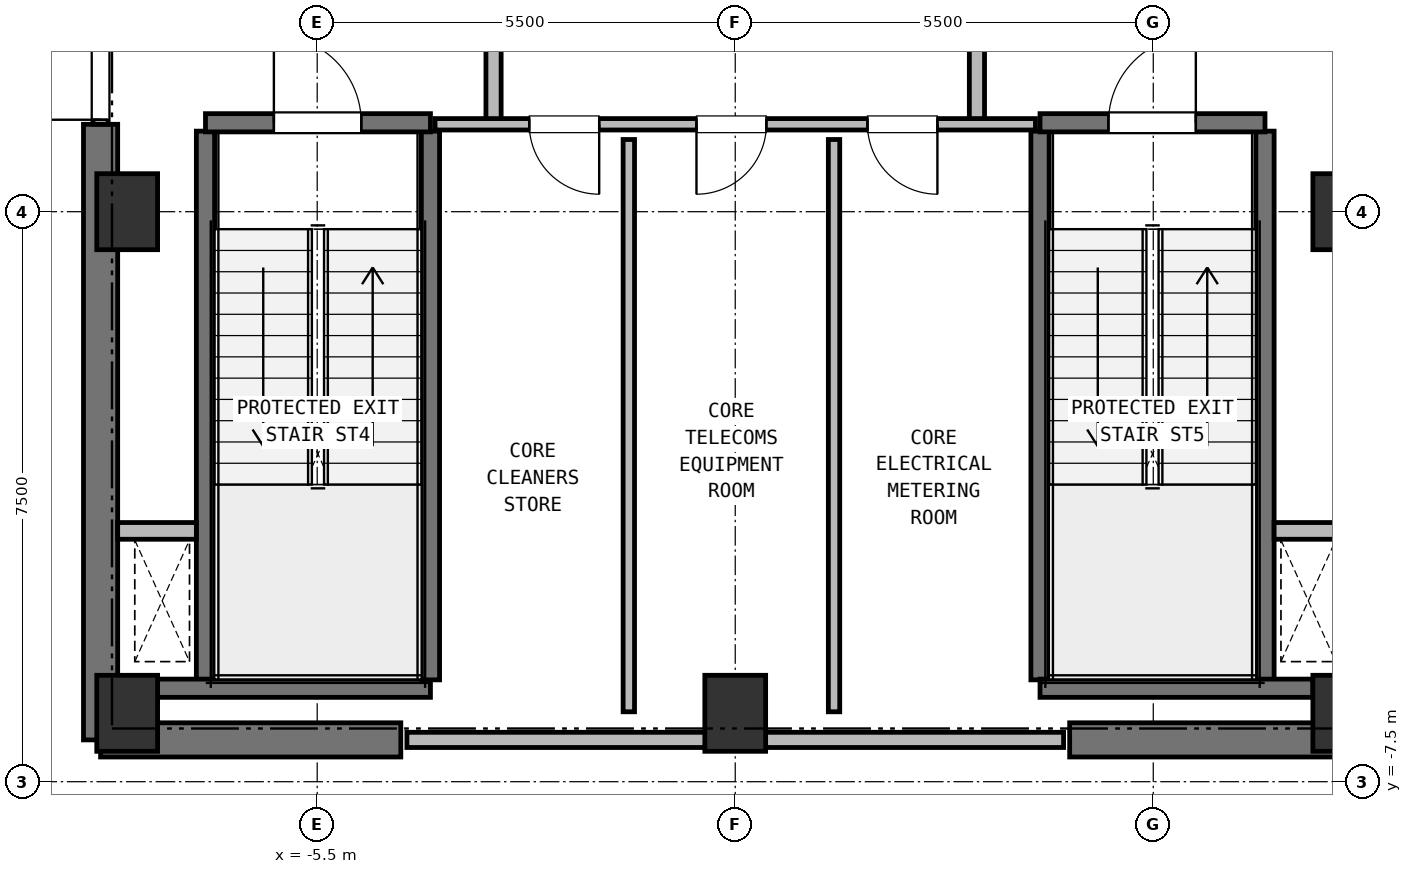
"""IFC4 building model, lengths in metres.
Left out: names, types, materials, properties, quantities, classifications, styles, units other than length and angle.
Written with IfcOpenShell. Run it as: python <this file> out.ifc"""

import sys

from ifc_helpers import new_model, si_unit, direction, frame, frame_2d, origin, origin_2d, place, context, subcontext, project, spatial, rectangle, extrude, element, fill, save


model = new_model("IFC4")
c1 = context("Model", 3, precision=1e-05, world=origin(), true_north=direction((0.0, 1.0)))
c2 = subcontext(c1, "Body", "Model", "MODEL_VIEW")
j1 = project(units=[si_unit("LENGTHUNIT", "METRE"), si_unit("PLANEANGLEUNIT", "RADIAN")], contexts=[c1])
p1 = place(None, origin())
s1 = spatial("IfcSite", under=j1, at=p1, CompositionType="ELEMENT")
p2 = place(p1, origin())
s2 = spatial("IfcBuilding", under=s1, at=p2, CompositionType="ELEMENT")
p3 = place(p2, frame((0.0, 0.0, 281.6)))
s3 = spatial("IfcBuildingStorey", under=s2, at=p3, CompositionType="ELEMENT", Elevation=281.6)
for number, where, z_axis, x_axis in (
    (1, (-8.0, -6.6, 0.0), (0.0, 0.0, 1.0), (1.0, 0.0, 0.0)),
    (2, (0.0, -6.6, 0.0), (0.0, 0.0, 1.0), (1.0, 0.0, 0.0)),
    (3, (8.0, -6.6, 0.0), (0.0, 0.0, 1.0), (1.0, 0.0, 0.0)),
    (4, (8.0, 0.0, 0.0), (0.0, 0.0, 1.0), (1.0, 0.0, 0.0)),
    (5, (-8.0, 0.0, 0.0), (0.0, 0.0, 1.0), (1.0, 0.0, 0.0)),
):
    element("IfcColumn", number, at=place(p3, frame(where, z_axis=z_axis, x_axis=x_axis)), inside=s3, PredefinedType="COLUMN", context=c2, shape_type="SweptSolid", body=[
        extrude(rectangle(XDim=0.8, YDim=1.0, at=origin_2d()), origin(), (0.0, 0.0, 1.0), 4.4),
    ])
for number, where, z_axis, x_axis in (
    (6, (-8.35, -6.95, 0.0), (0.0, 0.0, 1.0), (1.0, 0.0, 0.0)),
    (7, (4.4, -6.95, 0.0), (0.0, 0.0, 1.0), (1.0, 0.0, 0.0)),
):
    element("IfcWall", number, at=place(p3, frame(where, z_axis=z_axis, x_axis=x_axis)), inside=s3, PredefinedType="SHEAR", context=c2, shape_type="SweptSolid", body=[
        extrude(rectangle(XDim=3.95, YDim=0.45, at=frame_2d((1.975, 0.0))), origin(), (0.0, 0.0, 1.0), 4.13),
    ])
p4 = place(p3, frame((-8.35, -6.95, 0.0), z_axis=(0.0, 0.0, 1.0), x_axis=(0.0, 1.0, 0.0)))
e8 = element("IfcWall", 8, at=p4, inside=s3, PredefinedType="SHEAR", context=c2, shape_type="SweptSolid", body=[
    extrude(rectangle(XDim=8.1, YDim=0.45, at=frame_2d((4.05, 0.0))), origin(), (0.0, 0.0, 1.0), 4.13),
])
p5 = place(p3, frame((-6.97, -6.16, 0.0), z_axis=(0.0, 0.0, 1.0), x_axis=(0.0, 1.0, 0.0)))
e9 = element("IfcWall", 9, at=p5, inside=s3, PredefinedType="SHEAR", context=c2, shape_type="SweptSolid", body=[
    extrude(rectangle(XDim=7.22, YDim=0.24, at=frame_2d((3.61, 0.0))), origin(), (0.0, 0.0, 1.0), 4.13),
])
p6 = place(p3, frame((-7.6, -6.27, 0.0), z_axis=(0.0, 0.0, 1.0), x_axis=(1.0, 0.0, 0.0)))
e10 = element("IfcWall", 10, at=p6, inside=s3, PredefinedType="SHEAR", context=c2, shape_type="SweptSolid", body=[
    extrude(rectangle(XDim=3.59, YDim=0.24, at=frame_2d((1.795, 0.0))), origin(), (0.0, 0.0, 1.0), 4.13),
])
p7 = place(p3, frame((-4.01, -6.16, 0.0), z_axis=(0.0, 0.0, 1.0), x_axis=(0.0, 1.0, 0.0)))
e11 = element("IfcWall", 11, at=p7, inside=s3, PredefinedType="SHEAR", context=c2, shape_type="SweptSolid", body=[
    extrude(rectangle(XDim=7.22, YDim=0.24, at=frame_2d((3.61, 0.0))), origin(), (0.0, 0.0, 1.0), 4.13),
])
p8 = place(p3, frame((-6.97, 1.17, 0.0), z_axis=(0.0, 0.0, 1.0), x_axis=(1.0, 0.0, 0.0)))
e12 = element("IfcWall", 12, at=p8, inside=s3, PredefinedType="SHEAR", context=c2, shape_type="SweptSolid", body=[
    extrude(rectangle(XDim=2.96, YDim=0.24, at=frame_2d((1.48, 0.0))), origin(), (0.0, 0.0, 1.0), 4.13),
])
p9 = place(p8, frame((0.9, 0.0, 0.0)))
e13 = element("IfcOpeningElement", 13, at=p9, cuts=e12, PredefinedType="OPENING", context=c2, shape_type="SweptSolid", body=[
    extrude(rectangle(XDim=1.15, YDim=2.15, at=frame_2d((0.575, 1.075))), frame((0.0, 0.13, 0.0), z_axis=(0.0, -1.0, 0.0), x_axis=(1.0, 0.0, 0.0)), (0.0, 0.0, 1.0), 0.26),
])
for number, where, z_axis, x_axis in (
    (14, (4.01, -6.16, 0.0), (0.0, 0.0, 1.0), (0.0, 1.0, 0.0)),
    (15, (6.97, -6.16, 0.0), (0.0, 0.0, 1.0), (0.0, 1.0, 0.0)),
):
    element("IfcWall", number, at=place(p3, frame(where, z_axis=z_axis, x_axis=x_axis)), inside=s3, PredefinedType="SHEAR", context=c2, shape_type="SweptSolid", body=[
        extrude(rectangle(XDim=7.22, YDim=0.24, at=frame_2d((3.61, 0.0))), origin(), (0.0, 0.0, 1.0), 4.13),
    ])
p10 = place(p3, frame((4.01, -6.27, 0.0), z_axis=(0.0, 0.0, 1.0), x_axis=(1.0, 0.0, 0.0)))
e16 = element("IfcWall", 16, at=p10, inside=s3, PredefinedType="SHEAR", context=c2, shape_type="SweptSolid", body=[
    extrude(rectangle(XDim=3.59, YDim=0.24, at=frame_2d((1.795, 0.0))), origin(), (0.0, 0.0, 1.0), 4.13),
])
p11 = place(p3, frame((4.01, 1.17, 0.0), z_axis=(0.0, 0.0, 1.0), x_axis=(1.0, 0.0, 0.0)))
e17 = element("IfcWall", 17, at=p11, inside=s3, PredefinedType="SHEAR", context=c2, shape_type="SweptSolid", body=[
    extrude(rectangle(XDim=2.96, YDim=0.24, at=frame_2d((1.48, 0.0))), origin(), (0.0, 0.0, 1.0), 4.13),
])
p12 = place(p11, frame((0.9, 0.0, 0.0)))
e18 = element("IfcOpeningElement", 18, at=p12, cuts=e17, PredefinedType="OPENING", context=c2, shape_type="SweptSolid", body=[
    extrude(rectangle(XDim=1.15, YDim=2.15, at=frame_2d((0.575, 1.075))), frame((0.0, 0.13, 0.0), z_axis=(0.0, -1.0, 0.0), x_axis=(1.0, 0.0, 0.0)), (0.0, 0.0, 1.0), 0.26),
])
for number, where, z_axis, x_axis in (
    (19, (-8.125, -4.2, 0.0), (0.0, 0.0, 1.0), (1.0, 0.0, 0.0)),
    (20, (7.09, -4.2, 0.0), (0.0, 0.0, 1.0), (1.0, 0.0, 0.0)),
):
    element("IfcWall", number, at=place(p3, frame(where, z_axis=z_axis, x_axis=x_axis)), inside=s3, PredefinedType="PARTITIONING", context=c2, shape_type="SweptSolid", body=[
        extrude(rectangle(XDim=1.035, YDim=0.22, at=frame_2d((0.518, 0.0))), origin(), (0.0, 0.0, 1.0), 4.13),
    ])
p13 = place(p3, frame((-3.18, 1.15, 0.0), z_axis=(0.0, 0.0, 1.0), x_axis=(0.0, 1.0, 0.0)))
e21 = element("IfcWall", 21, at=p13, inside=s3, PredefinedType="PARTITIONING", context=c2, shape_type="SweptSolid", body=[
    extrude(rectangle(XDim=3.3, YDim=0.2, at=frame_2d((1.65, 0.0))), origin(), (0.0, 0.0, 1.0), 4.13),
])
p14 = place(p13, frame((1.08, 0.0, 0.0)))
e22 = element("IfcOpeningElement", 22, at=p14, cuts=e21, PredefinedType="OPENING", context=c2, shape_type="SweptSolid", body=[
    extrude(rectangle(XDim=1.15, YDim=2.15, at=frame_2d((0.575, 1.075))), frame((0.0, 0.11, 0.0), z_axis=(0.0, -1.0, 0.0), x_axis=(1.0, 0.0, 0.0)), (0.0, 0.0, 1.0), 0.22),
])
p15 = place(p3, frame((3.18, 1.15, 0.0), z_axis=(0.0, 0.0, 1.0), x_axis=(0.0, 1.0, 0.0)))
e23 = element("IfcWall", 23, at=p15, inside=s3, PredefinedType="PARTITIONING", context=c2, shape_type="SweptSolid", body=[
    extrude(rectangle(XDim=3.3, YDim=0.2, at=frame_2d((1.65, 0.0))), origin(), (0.0, 0.0, 1.0), 4.13),
])
p16 = place(p15, frame((1.08, 0.0, 0.0)))
e24 = element("IfcOpeningElement", 24, at=p16, cuts=e23, PredefinedType="OPENING", context=c2, shape_type="SweptSolid", body=[
    extrude(rectangle(XDim=1.15, YDim=2.15, at=frame_2d((0.575, 1.075))), frame((0.0, 0.11, 0.0), z_axis=(0.0, -1.0, 0.0), x_axis=(1.0, 0.0, 0.0)), (0.0, 0.0, 1.0), 0.22),
])
p17 = place(p3, frame((-8.35, 1.15, 0.0), z_axis=(0.0, 0.0, 1.0), x_axis=(0.0, 1.0, 0.0)))
e25 = element("IfcWall", 25, at=p17, inside=s3, PredefinedType="PARTITIONING", context=c2, shape_type="SweptSolid", body=[
    extrude(rectangle(XDim=5.4, YDim=0.2, at=frame_2d((2.7, 0.0))), origin(), (0.0, 0.0, 1.0), 4.13),
])
p18 = place(p17, frame((0.06, 0.0, 0.0)))
e26 = element("IfcOpeningElement", 26, at=p18, cuts=e25, PredefinedType="OPENING", context=c2, shape_type="SweptSolid", body=[
    extrude(rectangle(XDim=1.15, YDim=2.15, at=frame_2d((0.575, 1.075))), frame((0.0, 0.11, 0.0), z_axis=(0.0, -1.0, 0.0), x_axis=(1.0, 0.0, 0.0)), (0.0, 0.0, 1.0), 0.22),
])
p19 = place(p3, frame((3.95, 1.15, 0.0), z_axis=(0.0, 0.0, 1.0), x_axis=(-1.0, 0.0, 0.0)))
e27 = element("IfcWall", 27, at=p19, inside=s3, PredefinedType="PARTITIONING", context=c2, shape_type="SweptSolid", body=[
    extrude(rectangle(XDim=7.9, YDim=0.15, at=frame_2d((3.95, 0.0))), origin(), (0.0, 0.0, 1.0), 4.13),
])
p20 = place(p19, frame((5.74, 0.0, 0.0)))
e28 = element("IfcOpeningElement", 28, at=p20, cuts=e27, PredefinedType="OPENING", context=c2, shape_type="SweptSolid", body=[
    extrude(rectangle(XDim=0.92, YDim=2.05, at=frame_2d((0.46, 1.025))), frame((0.0, 0.085, 0.0), z_axis=(0.0, -1.0, 0.0), x_axis=(1.0, 0.0, 0.0)), (0.0, 0.0, 1.0), 0.17),
])
p21 = place(p19, frame((3.54, 0.0, 0.0)))
e29 = element("IfcOpeningElement", 29, at=p21, cuts=e27, PredefinedType="OPENING", context=c2, shape_type="SweptSolid", body=[
    extrude(rectangle(XDim=0.92, YDim=2.05, at=frame_2d((0.46, 1.025))), frame((0.0, 0.085, 0.0), z_axis=(0.0, -1.0, 0.0), x_axis=(1.0, 0.0, 0.0)), (0.0, 0.0, 1.0), 0.17),
])
p22 = place(p19, frame((1.29, 0.0, 0.0)))
e30 = element("IfcOpeningElement", 30, at=p22, cuts=e27, PredefinedType="OPENING", context=c2, shape_type="SweptSolid", body=[
    extrude(rectangle(XDim=0.92, YDim=2.05, at=frame_2d((0.46, 1.025))), frame((0.0, 0.085, 0.0), z_axis=(0.0, -1.0, 0.0), x_axis=(1.0, 0.0, 0.0)), (0.0, 0.0, 1.0), 0.17),
])
p23 = place(p3, frame((-4.32, -6.95, 0.0), z_axis=(0.0, 0.0, 1.0), x_axis=(1.0, 0.0, 0.0)))
e31 = element("IfcWall", 31, at=p23, inside=s3, PredefinedType="PARTITIONING", context=c2, shape_type="SweptSolid", body=[
    extrude(rectangle(XDim=8.64, YDim=0.2, at=frame_2d((4.32, 0.0))), origin(), (0.0, 0.0, 1.0), 4.13),
])
for number, where, z_axis, x_axis in (
    (32, (-1.4, -6.58, 0.0), (0.0, 0.0, 1.0), (0.0, 1.0, 0.0)),
    (33, (1.3, -6.58, 0.0), (0.0, 0.0, 1.0), (0.0, 1.0, 0.0)),
):
    element("IfcWall", number, at=place(p3, frame(where, z_axis=z_axis, x_axis=x_axis)), inside=s3, PredefinedType="PARTITIONING", context=c2, shape_type="SweptSolid", body=[
        extrude(rectangle(XDim=7.53, YDim=0.15, at=frame_2d((3.765, 0.0))), origin(), (0.0, 0.0, 1.0), 4.13),
    ])
p24 = place(p3, frame((-8.648, -9.151, 0.0), z_axis=(0.0, 0.0, 1.0), x_axis=(-0.693764562202, 0.720201869085, 0.0)))
e34 = element("IfcWall", 34, at=p24, inside=s3, PredefinedType="PARTITIONING", context=c2, shape_type="SweptSolid", body=[
    extrude(rectangle(XDim=2.558, YDim=0.15, at=frame_2d((1.279, 0.0))), origin(), (0.0, 0.0, 1.0), 4.13),
])
p25 = place(p9, origin())
e35 = element("IfcDoor", 35, at=p25, inside=s3, OperationType="SINGLE_SWING_LEFT", PredefinedType="DOOR", context=c2, shape_type="SweptSolid", body=[
    extrude(rectangle(XDim=1.15, YDim=2.15, at=frame_2d((0.575, 1.075))), frame((0.0, 0.025, 0.0), z_axis=(0.0, -1.0, 0.0), x_axis=(1.0, 0.0, 0.0)), (0.0, 0.0, 1.0), 0.05),
])
fill(e13, e35)
p26 = place(p12, origin())
e36 = element("IfcDoor", 36, at=p26, inside=s3, OperationType="SINGLE_SWING_RIGHT", PredefinedType="DOOR", context=c2, shape_type="SweptSolid", body=[
    extrude(rectangle(XDim=1.15, YDim=2.15, at=frame_2d((0.575, 1.075))), frame((0.0, 0.025, 0.0), z_axis=(0.0, -1.0, 0.0), x_axis=(1.0, 0.0, 0.0)), (0.0, 0.0, 1.0), 0.05),
])
fill(e18, e36)
p27 = place(p18, origin())
e37 = element("IfcDoor", 37, at=p27, inside=s3, OperationType="SINGLE_SWING_LEFT", PredefinedType="DOOR", context=c2, shape_type="SweptSolid", body=[
    extrude(rectangle(XDim=1.15, YDim=2.15, at=frame_2d((0.575, 1.075))), frame((0.0, 0.025, 0.0), z_axis=(0.0, -1.0, 0.0), x_axis=(1.0, 0.0, 0.0)), (0.0, 0.0, 1.0), 0.05),
])
fill(e26, e37)
p28 = place(p20, origin())
e38 = element("IfcDoor", 38, at=p28, inside=s3, OperationType="SINGLE_SWING_LEFT", PredefinedType="DOOR", context=c2, shape_type="SweptSolid", body=[
    extrude(rectangle(XDim=0.92, YDim=2.05, at=frame_2d((0.46, 1.025))), frame((0.0, 0.025, 0.0), z_axis=(0.0, -1.0, 0.0), x_axis=(1.0, 0.0, 0.0)), (0.0, 0.0, 1.0), 0.05),
])
fill(e28, e38)
p29 = place(p21, origin())
e39 = element("IfcDoor", 39, at=p29, inside=s3, OperationType="SINGLE_SWING_RIGHT", PredefinedType="DOOR", context=c2, shape_type="SweptSolid", body=[
    extrude(rectangle(XDim=0.92, YDim=2.05, at=frame_2d((0.46, 1.025))), frame((0.0, 0.025, 0.0), z_axis=(0.0, -1.0, 0.0), x_axis=(1.0, 0.0, 0.0)), (0.0, 0.0, 1.0), 0.05),
])
fill(e29, e39)
p30 = place(p22, origin())
e40 = element("IfcDoor", 40, at=p30, inside=s3, OperationType="SINGLE_SWING_LEFT", PredefinedType="DOOR", context=c2, shape_type="SweptSolid", body=[
    extrude(rectangle(XDim=0.92, YDim=2.05, at=frame_2d((0.46, 1.025))), frame((0.0, 0.025, 0.0), z_axis=(0.0, -1.0, 0.0), x_axis=(1.0, 0.0, 0.0)), (0.0, 0.0, 1.0), 0.05),
])
fill(e30, e40)
save(model, sys.argv[1])
